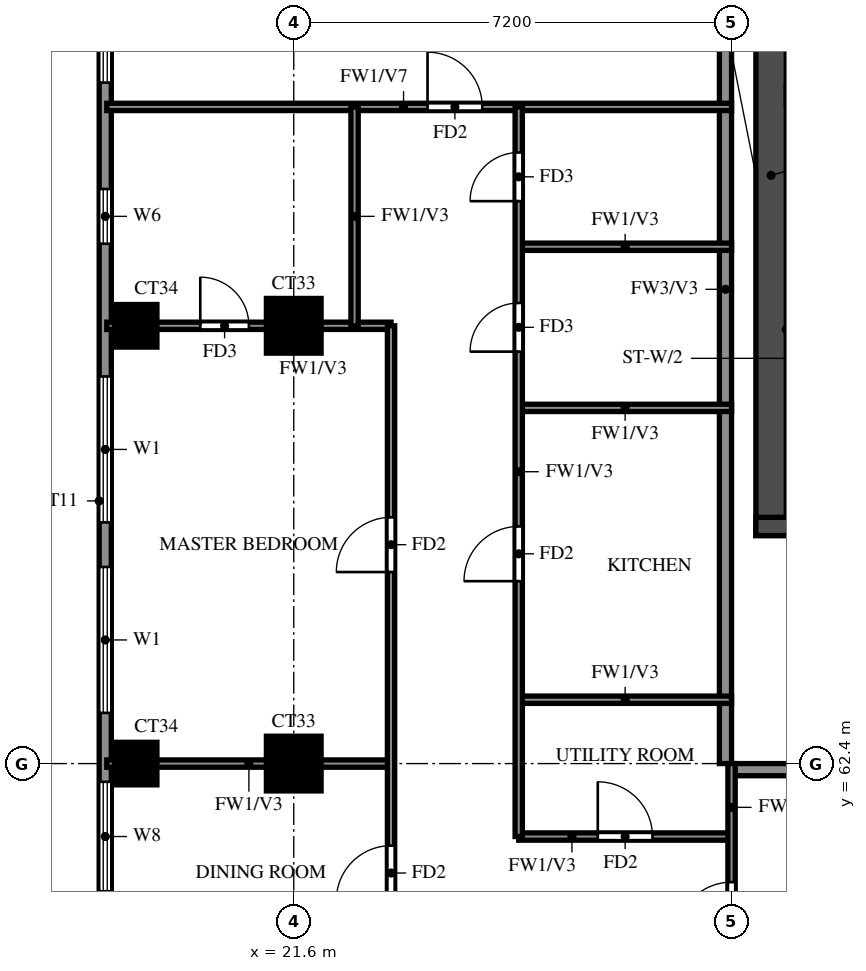
"""IFC4 building model, lengths in metres.
Left out: names, types, materials, properties, quantities, classifications, styles, units other than length and angle.
Written with IfcOpenShell. Run it as: python <this file> out.ifc"""

import sys

from ifc_helpers import new_model, si_unit, direction, frame, frame_2d, origin, origin_2d, place, context, subcontext, project, spatial, rectangle, extrude, source, transform, mapped, element, fill, save


model = new_model("IFC4")
c1 = context("Model", 3, precision=1e-05, world=origin(), true_north=direction((0.0, 1.0)))
c2 = subcontext(c1, "Body", "Model", "MODEL_VIEW")
j1 = project(units=[si_unit("LENGTHUNIT", "METRE"), si_unit("PLANEANGLEUNIT", "RADIAN")], contexts=[c1])
p1 = place(None, origin())
s1 = spatial("IfcSite", under=j1, at=p1, CompositionType="ELEMENT")
p2 = place(p1, origin())
s2 = spatial("IfcBuilding", under=s1, at=p2, CompositionType="ELEMENT")
p3 = place(p2, frame((0.0, 0.0, 218.5)))
s3 = spatial("IfcBuildingStorey", under=s2, at=p3, CompositionType="ELEMENT", Elevation=218.5)
m1 = source(origin(), c2, "Body", "SweptSolid", [
    extrude(rectangle(XDim=0.7, YDim=0.7, at=origin_2d()), origin(), (0.0, 0.0, 1.0), 3.22),
])
p4 = place(p3, frame((19.0, 62.4, 0.0), z_axis=(0.0, 0.0, 1.0), x_axis=(1.0, 0.0, 0.0)))
e1 = element("IfcColumn", 1, at=p4, inside=s3, PredefinedType="COLUMN", context=c2, shape_type="MappedRepresentation", body=[
    mapped(m1, transform((0.0, 0.0, 0.0))),
])
m2 = source(origin(), c2, "Body", "SweptSolid", [
    extrude(rectangle(XDim=0.9, YDim=0.9, at=origin_2d()), origin(), (0.0, 0.0, 1.0), 3.22),
])
p5 = place(p3, frame((21.6, 62.4, 0.0), z_axis=(0.0, 0.0, 1.0), x_axis=(1.0, 0.0, 0.0)))
e2 = element("IfcColumn", 2, at=p5, inside=s3, PredefinedType="COLUMN", context=c2, shape_type="MappedRepresentation", body=[
    mapped(m2, transform((0.0, 0.0, 0.0))),
])
p6 = place(p3, frame((19.0, 69.6, 0.0), z_axis=(0.0, 0.0, 1.0), x_axis=(1.0, 0.0, 0.0)))
e3 = element("IfcColumn", 3, at=p6, inside=s3, PredefinedType="COLUMN", context=c2, shape_type="MappedRepresentation", body=[
    mapped(m1, transform((0.0, 0.0, 0.0))),
])
p7 = place(p3, frame((21.6, 69.6, 0.0), z_axis=(0.0, 0.0, 1.0), x_axis=(1.0, 0.0, 0.0)))
e4 = element("IfcColumn", 4, at=p7, inside=s3, PredefinedType="COLUMN", context=c2, shape_type="MappedRepresentation", body=[
    mapped(m2, transform((0.0, 0.0, 0.0))),
])
p8 = place(p3, frame((29.45, 66.15, 0.0), z_axis=(0.0, 0.0, 1.0), x_axis=(0.0, 1.0, 0.0)))
e5 = element("IfcWall", 5, at=p8, inside=s3, PredefinedType="SHEAR", context=c2, shape_type="SweptSolid", body=[
    extrude(rectangle(XDim=11.85, YDim=0.5, at=frame_2d((5.925, 0.0))), origin(), (0.0, 0.0, 1.0), 3.22),
])
p9 = place(p3, frame((29.2, 66.3, 0.0), z_axis=(0.0, 0.0, 1.0), x_axis=(1.0, 0.0, 0.0)))
e6 = element("IfcWall", 6, at=p9, inside=s3, PredefinedType="SHEAR", context=c2, shape_type="SweptSolid", body=[
    extrude(rectangle(XDim=42.4, YDim=0.3, at=frame_2d((21.2, 0.0))), origin(), (0.0, 0.0, 1.0), 3.22),
])
p10 = place(p9, frame((1.425, 0.0, 0.0)))
e7 = element("IfcOpeningElement", 7, at=p10, cuts=e6, PredefinedType="OPENING", context=c2, shape_type="SweptSolid", body=[
    extrude(rectangle(XDim=1.1, YDim=2.1, at=frame_2d((0.55, 1.05))), frame((0.0, 0.16, 0.0), z_axis=(0.0, -1.0, 0.0), x_axis=(1.0, 0.0, 0.0)), (0.0, 0.0, 1.0), 0.32),
])
p11 = place(p9, frame((4.2, 0.0, 0.0)))
e8 = element("IfcOpeningElement", 8, at=p11, cuts=e6, PredefinedType="OPENING", context=c2, shape_type="SweptSolid", body=[
    extrude(rectangle(XDim=1.8, YDim=2.1, at=frame_2d((0.9, 1.05))), frame((0.0, 0.16, 0.0), z_axis=(0.0, -1.0, 0.0), x_axis=(1.0, 0.0, 0.0)), (0.0, 0.0, 1.0), 0.32),
])
p12 = place(p3, frame((18.5, 76.6, 0.0), z_axis=(0.0, 0.0, 1.0), x_axis=(0.0, -1.0, 0.0)))
e9 = element("IfcWall", 9, at=p12, inside=s3, PredefinedType="SOLIDWALL", context=c2, shape_type="SweptSolid", body=[
    extrude(rectangle(XDim=33.4, YDim=0.2, at=frame_2d((16.7, 0.0))), origin(), (0.0, 0.0, 1.0), 3.22),
])
p13 = place(p12, frame((18.7, 0.0, 0.0)))
e10 = element("IfcOpeningElement", 10, at=p13, cuts=e9, PredefinedType="OPENING", context=c2, shape_type="SweptSolid", body=[
    extrude(rectangle(XDim=1.8, YDim=2.4, at=frame_2d((0.9, 1.2))), frame((0.0, 0.11, 0.0), z_axis=(0.0, -1.0, 0.0), x_axis=(1.0, 0.0, 0.0)), (0.0, 0.0, 1.0), 0.22),
])
p14 = place(p12, frame((29.7, 0.0, 0.6)))
e11 = element("IfcOpeningElement", 11, at=p14, cuts=e9, PredefinedType="OPENING", context=c2, shape_type="SweptSolid", body=[
    extrude(rectangle(XDim=2.4, YDim=2.4, at=frame_2d((1.2, 1.2))), frame((0.0, 0.11, 0.0), z_axis=(0.0, -1.0, 0.0), x_axis=(1.0, 0.0, 0.0)), (0.0, 0.0, 1.0), 0.22),
])
p15 = place(p12, frame((25.6, 0.0, 0.6)))
e12 = element("IfcOpeningElement", 12, at=p15, cuts=e9, PredefinedType="OPENING", context=c2, shape_type="SweptSolid", body=[
    extrude(rectangle(XDim=2.4, YDim=2.4, at=frame_2d((1.2, 1.2))), frame((0.0, 0.11, 0.0), z_axis=(0.0, -1.0, 0.0), x_axis=(1.0, 0.0, 0.0)), (0.0, 0.0, 1.0), 0.22),
])
p16 = place(p12, frame((21.7, 0.0, 0.6)))
e13 = element("IfcOpeningElement", 13, at=p16, cuts=e9, PredefinedType="OPENING", context=c2, shape_type="SweptSolid", body=[
    extrude(rectangle(XDim=1.2, YDim=2.4, at=frame_2d((0.6, 1.2))), frame((0.0, 0.11, 0.0), z_axis=(0.0, -1.0, 0.0), x_axis=(1.0, 0.0, 0.0)), (0.0, 0.0, 1.0), 0.22),
])
p17 = place(p12, frame((23.95, 0.0, 0.6)))
e14 = element("IfcOpeningElement", 14, at=p17, cuts=e9, PredefinedType="OPENING", context=c2, shape_type="SweptSolid", body=[
    extrude(rectangle(XDim=0.9, YDim=2.4, at=frame_2d((0.45, 1.2))), frame((0.0, 0.11, 0.0), z_axis=(0.0, -1.0, 0.0), x_axis=(1.0, 0.0, 0.0)), (0.0, 0.0, 1.0), 0.22),
])
p18 = place(p12, frame((14.5, 0.0, 0.6)))
e15 = element("IfcOpeningElement", 15, at=p18, cuts=e9, PredefinedType="OPENING", context=c2, shape_type="SweptSolid", body=[
    extrude(rectangle(XDim=1.8, YDim=2.4, at=frame_2d((0.9, 1.2))), frame((0.0, 0.11, 0.0), z_axis=(0.0, -1.0, 0.0), x_axis=(1.0, 0.0, 0.0)), (0.0, 0.0, 1.0), 0.22),
])
p19 = place(p12, frame((7.833, 0.0, 0.6)))
e16 = element("IfcOpeningElement", 16, at=p19, cuts=e9, PredefinedType="OPENING", context=c2, shape_type="SweptSolid", body=[
    extrude(rectangle(XDim=2.4, YDim=2.4, at=frame_2d((1.2, 1.2))), frame((0.0, 0.11, 0.0), z_axis=(0.0, -1.0, 0.0), x_axis=(1.0, 0.0, 0.0)), (0.0, 0.0, 1.0), 0.22),
])
p20 = place(p12, frame((10.967, 0.0, 0.6)))
e17 = element("IfcOpeningElement", 17, at=p20, cuts=e9, PredefinedType="OPENING", context=c2, shape_type="SweptSolid", body=[
    extrude(rectangle(XDim=2.4, YDim=2.4, at=frame_2d((1.2, 1.2))), frame((0.0, 0.11, 0.0), z_axis=(0.0, -1.0, 0.0), x_axis=(1.0, 0.0, 0.0)), (0.0, 0.0, 1.0), 0.22),
])
p21 = place(p12, frame((4.75, 0.0, 1.5)))
e18 = element("IfcOpeningElement", 18, at=p21, cuts=e9, PredefinedType="OPENING", context=c2, shape_type="SweptSolid", body=[
    extrude(rectangle(XDim=0.9, YDim=0.9, at=frame_2d((0.45, 0.45))), frame((0.0, 0.11, 0.0), z_axis=(0.0, -1.0, 0.0), x_axis=(1.0, 0.0, 0.0)), (0.0, 0.0, 1.0), 0.22),
])
p22 = place(p12, frame((0.6, 0.0, 0.6)))
e19 = element("IfcOpeningElement", 19, at=p22, cuts=e9, PredefinedType="OPENING", context=c2, shape_type="SweptSolid", body=[
    extrude(rectangle(XDim=2.4, YDim=2.4, at=frame_2d((1.2, 1.2))), frame((0.0, 0.11, 0.0), z_axis=(0.0, -1.0, 0.0), x_axis=(1.0, 0.0, 0.0)), (0.0, 0.0, 1.0), 0.22),
])
p23 = place(p3, frame((28.8, 62.3, 0.0), z_axis=(0.0, 0.0, 1.0), x_axis=(1.0, 0.0, 0.0)))
e20 = element("IfcWall", 20, at=p23, inside=s3, PredefinedType="SOLIDWALL", context=c2, shape_type="SweptSolid", body=[
    extrude(rectangle(XDim=4.8, YDim=0.2, at=frame_2d((2.4, 0.0))), origin(), (0.0, 0.0, 1.0), 3.22),
])
p24 = place(p3, frame((28.7, 62.4, 0.0), z_axis=(0.0, 0.0, 1.0), x_axis=(0.0, 1.0, 0.0)))
e21 = element("IfcWall", 21, at=p24, inside=s3, PredefinedType="SOLIDWALL", context=c2, shape_type="SweptSolid", body=[
    extrude(rectangle(XDim=15.6, YDim=0.2, at=frame_2d((7.8, 0.0))), origin(), (0.0, 0.0, 1.0), 3.22),
])
p25 = place(p3, frame((25.3, 61.2, 0.0), z_axis=(0.0, 0.0, 1.0), x_axis=(1.0, 0.0, 0.0)))
e22 = element("IfcWall", 22, at=p25, inside=s3, PredefinedType="PARTITIONING", context=c2, shape_type="SweptSolid", body=[
    extrude(rectangle(XDim=3.5, YDim=0.12, at=frame_2d((1.75, 0.0))), origin(), (0.0, 0.0, 1.0), 3.22),
])
p26 = place(p25, frame((1.3, 0.0, 0.0)))
e23 = element("IfcOpeningElement", 23, at=p26, cuts=e22, PredefinedType="OPENING", context=c2, shape_type="SweptSolid", body=[
    extrude(rectangle(XDim=0.9, YDim=2.1, at=frame_2d((0.45, 1.05))), frame((0.0, 0.07, 0.0), z_axis=(0.0, -1.0, 0.0), x_axis=(1.0, 0.0, 0.0)), (0.0, 0.0, 1.0), 0.14),
])
p27 = place(p3, frame((18.525, 62.4, 0.0), z_axis=(0.0, 0.0, 1.0), x_axis=(1.0, 0.0, 0.0)))
e24 = element("IfcWall", 24, at=p27, inside=s3, PredefinedType="PARTITIONING", context=c2, shape_type="SweptSolid", body=[
    extrude(rectangle(XDim=4.675, YDim=0.12, at=frame_2d((2.337, 0.0))), origin(), (0.0, 0.0, 1.0), 3.22),
])
for number, where, z_axis, x_axis in (
    (25, (25.3, 63.45, 0.0), (0.0, 0.0, 1.0), (1.0, 0.0, 0.0)),
    (26, (25.3, 68.25, 0.0), (0.0, 0.0, 1.0), (1.0, 0.0, 0.0)),
):
    element("IfcWall", number, at=place(p3, frame(where, z_axis=z_axis, x_axis=x_axis)), inside=s3, PredefinedType="PARTITIONING", context=c2, shape_type="SweptSolid", body=[
        extrude(rectangle(XDim=3.5, YDim=0.12, at=frame_2d((1.75, 0.0))), origin(), (0.0, 0.0, 1.0), 3.22),
    ])
p28 = place(p3, frame((18.525, 69.6, 0.0), z_axis=(0.0, 0.0, 1.0), x_axis=(1.0, 0.0, 0.0)))
e27 = element("IfcWall", 27, at=p28, inside=s3, PredefinedType="PARTITIONING", context=c2, shape_type="SweptSolid", body=[
    extrude(rectangle(XDim=4.675, YDim=0.12, at=frame_2d((2.337, 0.0))), origin(), (0.0, 0.0, 1.0), 3.22),
])
p29 = place(p28, frame((1.538, 0.0, 0.0)))
e28 = element("IfcOpeningElement", 28, at=p29, cuts=e27, PredefinedType="OPENING", context=c2, shape_type="SweptSolid", body=[
    extrude(rectangle(XDim=0.8, YDim=2.1, at=frame_2d((0.4, 1.05))), frame((0.0, 0.07, 0.0), z_axis=(0.0, -1.0, 0.0), x_axis=(1.0, 0.0, 0.0)), (0.0, 0.0, 1.0), 0.14),
])
p30 = place(p3, frame((25.3, 70.9, 0.0), z_axis=(0.0, 0.0, 1.0), x_axis=(1.0, 0.0, 0.0)))
e29 = element("IfcWall", 29, at=p30, inside=s3, PredefinedType="PARTITIONING", context=c2, shape_type="SweptSolid", body=[
    extrude(rectangle(XDim=3.5, YDim=0.12, at=frame_2d((1.75, 0.0))), origin(), (0.0, 0.0, 1.0), 3.22),
])
p31 = place(p3, frame((18.525, 73.2, 0.0), z_axis=(0.0, 0.0, 1.0), x_axis=(1.0, 0.0, 0.0)))
e30 = element("IfcWall", 30, at=p31, inside=s3, PredefinedType="PARTITIONING", context=c2, shape_type="SweptSolid", body=[
    extrude(rectangle(XDim=10.275, YDim=0.12, at=frame_2d((5.138, 0.0))), origin(), (0.0, 0.0, 1.0), 2.32),
])
p32 = place(p31, frame((5.275, 0.0, 0.0)))
e31 = element("IfcOpeningElement", 31, at=p32, cuts=e30, PredefinedType="OPENING", context=c2, shape_type="SweptSolid", body=[
    extrude(rectangle(XDim=0.9, YDim=2.1, at=frame_2d((0.45, 1.05))), frame((0.0, 0.07, 0.0), z_axis=(0.0, -1.0, 0.0), x_axis=(1.0, 0.0, 0.0)), (0.0, 0.0, 1.0), 0.14),
])
p33 = place(p3, frame((22.6, 69.6, 0.0), z_axis=(0.0, 0.0, 1.0), x_axis=(0.0, 1.0, 0.0)))
e32 = element("IfcWall", 32, at=p33, inside=s3, PredefinedType="PARTITIONING", context=c2, shape_type="SweptSolid", body=[
    extrude(rectangle(XDim=3.6, YDim=0.12, at=frame_2d((1.8, 0.0))), origin(), (0.0, 0.0, 1.0), 3.22),
])
p34 = place(p3, frame((23.2, 48.0, 0.0), z_axis=(0.0, 0.0, 1.0), x_axis=(0.0, 1.0, 0.0)))
e33 = element("IfcWall", 33, at=p34, inside=s3, PredefinedType="PARTITIONING", context=c2, shape_type="SweptSolid", body=[
    extrude(rectangle(XDim=21.6, YDim=0.12, at=frame_2d((10.8, 0.0))), origin(), (0.0, 0.0, 1.0), 3.22),
])
p35 = place(p34, frame((1.35, 0.0, 0.0)))
e34 = element("IfcOpeningElement", 34, at=p35, cuts=e33, PredefinedType="OPENING", context=c2, shape_type="SweptSolid", body=[
    extrude(rectangle(XDim=0.9, YDim=2.1, at=frame_2d((0.45, 1.05))), frame((0.0, 0.07, 0.0), z_axis=(0.0, -1.0, 0.0), x_axis=(1.0, 0.0, 0.0)), (0.0, 0.0, 1.0), 0.14),
])
p36 = place(p34, frame((4.95, 0.0, 0.0)))
e35 = element("IfcOpeningElement", 35, at=p36, cuts=e33, PredefinedType="OPENING", context=c2, shape_type="SweptSolid", body=[
    extrude(rectangle(XDim=0.9, YDim=2.1, at=frame_2d((0.45, 1.05))), frame((0.0, 0.07, 0.0), z_axis=(0.0, -1.0, 0.0), x_axis=(1.0, 0.0, 0.0)), (0.0, 0.0, 1.0), 0.14),
])
p37 = place(p34, frame((8.25, 0.0, 0.0)))
e36 = element("IfcOpeningElement", 36, at=p37, cuts=e33, PredefinedType="OPENING", context=c2, shape_type="SweptSolid", body=[
    extrude(rectangle(XDim=1.5, YDim=2.1, at=frame_2d((0.75, 1.05))), frame((0.0, 0.07, 0.0), z_axis=(0.0, -1.0, 0.0), x_axis=(1.0, 0.0, 0.0)), (0.0, 0.0, 1.0), 0.14),
])
p38 = place(p34, frame((12.15, 0.0, 0.0)))
e37 = element("IfcOpeningElement", 37, at=p38, cuts=e33, PredefinedType="OPENING", context=c2, shape_type="SweptSolid", body=[
    extrude(rectangle(XDim=0.9, YDim=2.1, at=frame_2d((0.45, 1.05))), frame((0.0, 0.07, 0.0), z_axis=(0.0, -1.0, 0.0), x_axis=(1.0, 0.0, 0.0)), (0.0, 0.0, 1.0), 0.14),
])
p39 = place(p34, frame((17.55, 0.0, 0.0)))
e38 = element("IfcOpeningElement", 38, at=p39, cuts=e33, PredefinedType="OPENING", context=c2, shape_type="SweptSolid", body=[
    extrude(rectangle(XDim=0.9, YDim=2.1, at=frame_2d((0.45, 1.05))), frame((0.0, 0.07, 0.0), z_axis=(0.0, -1.0, 0.0), x_axis=(1.0, 0.0, 0.0)), (0.0, 0.0, 1.0), 0.14),
])
p40 = place(p3, frame((25.3, 61.2, 0.0), z_axis=(0.0, 0.0, 1.0), x_axis=(0.0, 1.0, 0.0)))
e39 = element("IfcWall", 39, at=p40, inside=s3, PredefinedType="PARTITIONING", context=c2, shape_type="SweptSolid", body=[
    extrude(rectangle(XDim=12.0, YDim=0.12, at=frame_2d((6.0, 0.0))), origin(), (0.0, 0.0, 1.0), 3.22),
])
p41 = place(p40, frame((4.2, 0.0, 0.0)))
e40 = element("IfcOpeningElement", 40, at=p41, cuts=e39, PredefinedType="OPENING", context=c2, shape_type="SweptSolid", body=[
    extrude(rectangle(XDim=0.9, YDim=2.1, at=frame_2d((0.45, 1.05))), frame((0.0, 0.07, 0.0), z_axis=(0.0, -1.0, 0.0), x_axis=(1.0, 0.0, 0.0)), (0.0, 0.0, 1.0), 0.14),
])
p42 = place(p40, frame((7.975, 0.0, 0.0)))
e41 = element("IfcOpeningElement", 41, at=p42, cuts=e39, PredefinedType="OPENING", context=c2, shape_type="SweptSolid", body=[
    extrude(rectangle(XDim=0.8, YDim=2.1, at=frame_2d((0.4, 1.05))), frame((0.0, 0.07, 0.0), z_axis=(0.0, -1.0, 0.0), x_axis=(1.0, 0.0, 0.0)), (0.0, 0.0, 1.0), 0.14),
])
p43 = place(p40, frame((10.45, 0.0, 0.0)))
e42 = element("IfcOpeningElement", 42, at=p43, cuts=e39, PredefinedType="OPENING", context=c2, shape_type="SweptSolid", body=[
    extrude(rectangle(XDim=0.8, YDim=2.1, at=frame_2d((0.4, 1.05))), frame((0.0, 0.07, 0.0), z_axis=(0.0, -1.0, 0.0), x_axis=(1.0, 0.0, 0.0)), (0.0, 0.0, 1.0), 0.14),
])
p44 = place(p3, frame((28.8, 58.8, 0.0), z_axis=(0.0, 0.0, 1.0), x_axis=(0.0, 1.0, 0.0)))
e43 = element("IfcWall", 43, at=p44, inside=s3, PredefinedType="PARTITIONING", context=c2, shape_type="SweptSolid", body=[
    extrude(rectangle(XDim=3.6, YDim=0.12, at=frame_2d((1.8, 0.0))), origin(), (0.0, 0.0, 1.0), 3.22),
])
p45 = place(p44, frame((0.75, 0.0, 0.0)))
e44 = element("IfcOpeningElement", 44, at=p45, cuts=e43, PredefinedType="OPENING", context=c2, shape_type="SweptSolid", body=[
    extrude(rectangle(XDim=0.9, YDim=2.1, at=frame_2d((0.45, 1.05))), frame((0.0, 0.07, 0.0), z_axis=(0.0, -1.0, 0.0), x_axis=(1.0, 0.0, 0.0)), (0.0, 0.0, 1.0), 0.14),
])
p46 = place(p18, origin())
e45 = element("IfcWindow", 45, at=p46, inside=s3, PartitioningType="DOUBLE_PANEL_VERTICAL", PredefinedType="WINDOW", context=c2, shape_type="SweptSolid", body=[
    extrude(rectangle(XDim=1.8, YDim=2.4, at=frame_2d((0.9, 1.2))), frame((0.0, 0.03, 0.0), z_axis=(0.0, -1.0, 0.0), x_axis=(1.0, 0.0, 0.0)), (0.0, 0.0, 1.0), 0.06),
])
fill(e15, e45)
p47 = place(p19, origin())
e46 = element("IfcWindow", 46, at=p47, inside=s3, PartitioningType="DOUBLE_PANEL_VERTICAL", PredefinedType="WINDOW", context=c2, shape_type="SweptSolid", body=[
    extrude(rectangle(XDim=2.4, YDim=2.4, at=frame_2d((1.2, 1.2))), frame((0.0, 0.03, 0.0), z_axis=(0.0, -1.0, 0.0), x_axis=(1.0, 0.0, 0.0)), (0.0, 0.0, 1.0), 0.06),
])
fill(e16, e46)
p48 = place(p20, origin())
e47 = element("IfcWindow", 47, at=p48, inside=s3, PartitioningType="DOUBLE_PANEL_VERTICAL", PredefinedType="WINDOW", context=c2, shape_type="SweptSolid", body=[
    extrude(rectangle(XDim=2.4, YDim=2.4, at=frame_2d((1.2, 1.2))), frame((0.0, 0.03, 0.0), z_axis=(0.0, -1.0, 0.0), x_axis=(1.0, 0.0, 0.0)), (0.0, 0.0, 1.0), 0.06),
])
fill(e17, e47)
p49 = place(p21, origin())
e48 = element("IfcWindow", 48, at=p49, inside=s3, PartitioningType="SINGLE_PANEL", PredefinedType="WINDOW", context=c2, shape_type="SweptSolid", body=[
    extrude(rectangle(XDim=0.9, YDim=0.9, at=frame_2d((0.45, 0.45))), frame((0.0, 0.03, 0.0), z_axis=(0.0, -1.0, 0.0), x_axis=(1.0, 0.0, 0.0)), (0.0, 0.0, 1.0), 0.06),
])
fill(e18, e48)
p50 = place(p22, origin())
e49 = element("IfcWindow", 49, at=p50, inside=s3, PartitioningType="DOUBLE_PANEL_VERTICAL", PredefinedType="WINDOW", context=c2, shape_type="SweptSolid", body=[
    extrude(rectangle(XDim=2.4, YDim=2.4, at=frame_2d((1.2, 1.2))), frame((0.0, 0.03, 0.0), z_axis=(0.0, -1.0, 0.0), x_axis=(1.0, 0.0, 0.0)), (0.0, 0.0, 1.0), 0.06),
])
fill(e19, e49)
p51 = place(p45, origin())
e50 = element("IfcDoor", 50, at=p51, inside=s3, OperationType="SINGLE_SWING_LEFT", PredefinedType="DOOR", context=c2, shape_type="SweptSolid", body=[
    extrude(rectangle(XDim=0.9, YDim=2.1, at=frame_2d((0.45, 1.05))), frame((0.0, 0.025, 0.0), z_axis=(0.0, -1.0, 0.0), x_axis=(1.0, 0.0, 0.0)), (0.0, 0.0, 1.0), 0.05),
])
fill(e44, e50)
p52 = place(p38, origin())
e51 = element("IfcDoor", 51, at=p52, inside=s3, OperationType="SINGLE_SWING_LEFT", PredefinedType="DOOR", context=c2, shape_type="SweptSolid", body=[
    extrude(rectangle(XDim=0.9, YDim=2.1, at=frame_2d((0.45, 1.05))), frame((0.0, 0.025, 0.0), z_axis=(0.0, -1.0, 0.0), x_axis=(1.0, 0.0, 0.0)), (0.0, 0.0, 1.0), 0.05),
])
fill(e37, e51)
p53 = place(p39, origin())
e52 = element("IfcDoor", 52, at=p53, inside=s3, OperationType="SINGLE_SWING_LEFT", PredefinedType="DOOR", context=c2, shape_type="SweptSolid", body=[
    extrude(rectangle(XDim=0.9, YDim=2.1, at=frame_2d((0.45, 1.05))), frame((0.0, 0.025, 0.0), z_axis=(0.0, -1.0, 0.0), x_axis=(1.0, 0.0, 0.0)), (0.0, 0.0, 1.0), 0.05),
])
fill(e38, e52)
p54 = place(p29, origin())
e53 = element("IfcDoor", 53, at=p54, inside=s3, OperationType="SINGLE_SWING_LEFT", PredefinedType="DOOR", context=c2, shape_type="SweptSolid", body=[
    extrude(rectangle(XDim=0.8, YDim=2.1, at=frame_2d((0.4, 1.05))), frame((0.0, 0.025, 0.0), z_axis=(0.0, -1.0, 0.0), x_axis=(1.0, 0.0, 0.0)), (0.0, 0.0, 1.0), 0.05),
])
fill(e28, e53)
p55 = place(p32, origin())
e54 = element("IfcDoor", 54, at=p55, inside=s3, OperationType="SINGLE_SWING_LEFT", PredefinedType="DOOR", context=c2, shape_type="SweptSolid", body=[
    extrude(rectangle(XDim=0.9, YDim=2.1, at=frame_2d((0.45, 1.05))), frame((0.0, 0.025, 0.0), z_axis=(0.0, -1.0, 0.0), x_axis=(1.0, 0.0, 0.0)), (0.0, 0.0, 1.0), 0.05),
])
fill(e31, e54)
p56 = place(p26, origin())
e55 = element("IfcDoor", 55, at=p56, inside=s3, OperationType="SINGLE_SWING_LEFT", PredefinedType="DOOR", context=c2, shape_type="SweptSolid", body=[
    extrude(rectangle(XDim=0.9, YDim=2.1, at=frame_2d((0.45, 1.05))), frame((0.0, 0.025, 0.0), z_axis=(0.0, -1.0, 0.0), x_axis=(1.0, 0.0, 0.0)), (0.0, 0.0, 1.0), 0.05),
])
fill(e23, e55)
p57 = place(p41, origin())
e56 = element("IfcDoor", 56, at=p57, inside=s3, OperationType="SINGLE_SWING_RIGHT", PredefinedType="DOOR", context=c2, shape_type="SweptSolid", body=[
    extrude(rectangle(XDim=0.9, YDim=2.1, at=frame_2d((0.45, 1.05))), frame((0.0, 0.025, 0.0), z_axis=(0.0, -1.0, 0.0), x_axis=(1.0, 0.0, 0.0)), (0.0, 0.0, 1.0), 0.05),
])
fill(e40, e56)
p58 = place(p42, origin())
e57 = element("IfcDoor", 57, at=p58, inside=s3, OperationType="SINGLE_SWING_LEFT", PredefinedType="DOOR", context=c2, shape_type="SweptSolid", body=[
    extrude(rectangle(XDim=0.8, YDim=2.1, at=frame_2d((0.4, 1.05))), frame((0.0, 0.025, 0.0), z_axis=(0.0, -1.0, 0.0), x_axis=(1.0, 0.0, 0.0)), (0.0, 0.0, 1.0), 0.05),
])
fill(e41, e57)
p59 = place(p43, origin())
e58 = element("IfcDoor", 58, at=p59, inside=s3, OperationType="SINGLE_SWING_LEFT", PredefinedType="DOOR", context=c2, shape_type="SweptSolid", body=[
    extrude(rectangle(XDim=0.8, YDim=2.1, at=frame_2d((0.4, 1.05))), frame((0.0, 0.025, 0.0), z_axis=(0.0, -1.0, 0.0), x_axis=(1.0, 0.0, 0.0)), (0.0, 0.0, 1.0), 0.05),
])
fill(e42, e58)
save(model, sys.argv[1])
